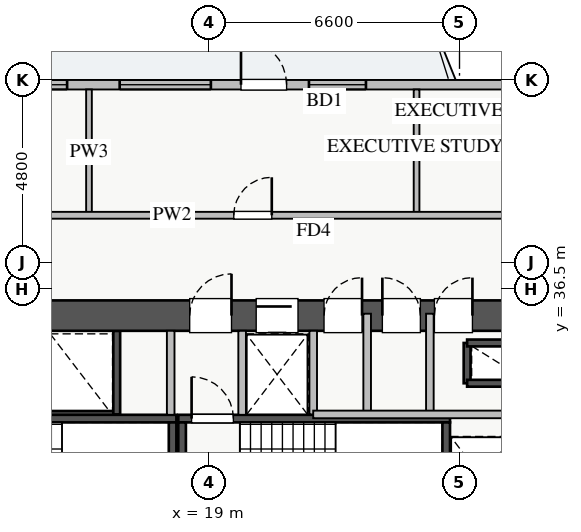
"""IFC4 building model, lengths in metres.
Left out: names, types, materials, properties, quantities, classifications, styles, units other than length and angle.
Written with IfcOpenShell. Run it as: python <this file> out.ifc"""

import sys

from ifc_helpers import new_model, si_unit, direction, frame, frame_2d, origin, place, context, subcontext, project, spatial, rectangle, extrude, source, transform, mapped, element, fill, save


model = new_model("IFC4")
c1 = context("Model", 3, precision=1e-05, world=origin(), true_north=direction((0.0, 1.0)))
c2 = subcontext(c1, "Body", "Model", "MODEL_VIEW")
j1 = project(units=[si_unit("LENGTHUNIT", "METRE"), si_unit("PLANEANGLEUNIT", "RADIAN")], contexts=[c1])
p1 = place(None, origin())
s1 = spatial("IfcSite", under=j1, at=p1, CompositionType="ELEMENT")
p2 = place(p1, origin())
s2 = spatial("IfcBuilding", under=s1, at=p2, CompositionType="ELEMENT")
p3 = place(p2, frame((0.0, 0.0, 89.25)))
s3 = spatial("IfcBuildingStorey", under=s2, at=p3, CompositionType="ELEMENT", Elevation=89.25)
p4 = place(p3, frame((25.8, 34.02, 0.0), z_axis=(0.0, 0.0, 1.0), x_axis=(0.0, 1.0, 0.0)))
e1 = element("IfcWall", 1, at=p4, inside=s3, PredefinedType="SHEAR", context=c2, shape_type="SweptSolid", body=[
    extrude(rectangle(XDim=1.06, YDim=0.18, at=frame_2d((0.53, 0.0))), origin(), (0.0, 0.0, 1.0), 3.03),
])
for number, where, z_axis, x_axis in (
    (2, (25.8, 35.08, 0.0), (0.0, 0.0, 1.0), (1.0, 0.0, 0.0)),
    (3, (25.8, 34.02, 0.0), (0.0, 0.0, 1.0), (1.0, 0.0, 0.0)),
):
    element("IfcWall", number, at=place(p3, frame(where, z_axis=z_axis, x_axis=x_axis)), inside=s3, PredefinedType="SHEAR", context=c2, shape_type="SweptSolid", body=[
        extrude(rectangle(XDim=1.2, YDim=0.18, at=frame_2d((0.6, 0.0))), origin(), (0.0, 0.0, 1.0), 3.03),
    ])
p5 = place(p3, frame((14.62, 33.2, 0.0), z_axis=(0.0, 0.0, 1.0), x_axis=(1.0, 0.0, 0.0)))
e4 = element("IfcWall", 4, at=p5, inside=s3, PredefinedType="SHEAR", context=c2, shape_type="SweptSolid", body=[
    extrude(rectangle(XDim=1.96, YDim=0.18, at=frame_2d((0.98, 0.0))), origin(), (0.0, 0.0, 1.0), 3.03),
])
p6 = place(p3, frame((16.58, 33.2, 0.0), z_axis=(0.0, 0.0, 1.0), x_axis=(0.0, 1.0, 0.0)))
e5 = element("IfcWall", 5, at=p6, inside=s3, PredefinedType="SHEAR", context=c2, shape_type="SweptSolid", body=[
    extrude(rectangle(XDim=2.2, YDim=0.18, at=frame_2d((1.1, 0.0))), origin(), (0.0, 0.0, 1.0), 3.03),
])
p7 = place(p3, frame((19.88, 33.2, 0.0), z_axis=(0.0, 0.0, 1.0), x_axis=(1.0, 0.0, 0.0)))
e6 = element("IfcWall", 6, at=p7, inside=s3, PredefinedType="SHEAR", context=c2, shape_type="SweptSolid", body=[
    extrude(rectangle(XDim=1.87, YDim=0.18, at=frame_2d((0.935, 0.0))), origin(), (0.0, 0.0, 1.0), 3.03),
])
p8 = place(p3, frame((11.0, 33.09, 0.0), z_axis=(0.0, 0.0, 1.0), x_axis=(1.0, 0.0, 0.0)))
e7 = element("IfcWall", 7, at=p8, inside=s3, PredefinedType="SHEAR", context=c2, shape_type="SweptSolid", body=[
    extrude(rectangle(XDim=7.15, YDim=0.2, at=frame_2d((3.575, 0.0))), origin(), (0.0, 0.0, 1.0), 3.25),
])
p9 = place(p8, frame((0.35, 0.0, 0.0)))
e8 = element("IfcOpeningElement", 8, at=p9, cuts=e7, PredefinedType="OPENING", context=c2, shape_type="SweptSolid", body=[
    extrude(rectangle(XDim=1.1, YDim=2.05, at=frame_2d((0.55, 1.025))), frame((0.0, 0.11, 0.0), z_axis=(0.0, -1.0, 0.0), x_axis=(1.0, 0.0, 0.0)), (0.0, 0.0, 1.0), 0.22),
])
p10 = place(p3, frame((18.05, 30.05, 0.0), z_axis=(0.0, 0.0, 1.0), x_axis=(0.0, 1.0, 0.0)))
e9 = element("IfcWall", 9, at=p10, inside=s3, PredefinedType="SHEAR", context=c2, shape_type="SweptSolid", body=[
    extrude(rectangle(XDim=2.94, YDim=0.2, at=frame_2d((1.47, 0.0))), origin(), (0.0, 0.0, 1.0), 3.25),
])
p11 = place(p3, frame((18.2, 33.09, 0.0), z_axis=(0.0, 0.0, 1.0), x_axis=(1.0, 0.0, 0.0)))
e10 = element("IfcWall", 10, at=p11, inside=s3, PredefinedType="SHEAR", context=c2, shape_type="SweptSolid", body=[
    extrude(rectangle(XDim=7.15, YDim=0.2, at=frame_2d((3.575, 0.0))), origin(), (0.0, 0.0, 1.0), 3.25),
])
p12 = place(p11, frame((0.35, 0.0, 0.0)))
e11 = element("IfcOpeningElement", 11, at=p12, cuts=e10, PredefinedType="OPENING", context=c2, shape_type="SweptSolid", body=[
    extrude(rectangle(XDim=1.1, YDim=2.05, at=frame_2d((0.55, 1.025))), frame((0.0, 0.11, 0.0), z_axis=(0.0, -1.0, 0.0), x_axis=(1.0, 0.0, 0.0)), (0.0, 0.0, 1.0), 0.22),
])
for number, where, z_axis, x_axis in (
    (12, (18.3, 30.05, 0.0), (0.0, 0.0, 1.0), (0.0, 1.0, 0.0)),
    (13, (25.25, 30.05, 0.0), (0.0, 0.0, 1.0), (0.0, 1.0, 0.0)),
):
    element("IfcWall", number, at=place(p3, frame(where, z_axis=z_axis, x_axis=x_axis)), inside=s3, PredefinedType="SHEAR", context=c2, shape_type="SweptSolid", body=[
        extrude(rectangle(XDim=2.94, YDim=0.2, at=frame_2d((1.47, 0.0))), origin(), (0.0, 0.0, 1.0), 3.25),
    ])
p13 = place(p3, frame((10.2, 35.8, 0.0), z_axis=(0.0, 0.0, 1.0), x_axis=(1.0, 0.0, 0.0)))
e14 = element("IfcWall", 14, at=p13, inside=s3, PredefinedType="SHEAR", context=c2, shape_type="SweptSolid", body=[
    extrude(rectangle(XDim=17.6, YDim=0.8, at=frame_2d((8.8, 0.0))), origin(), (0.0, 0.0, 1.0), 3.25),
])
p14 = place(p13, frame((1.15, 0.0, 0.0)))
e15 = element("IfcOpeningElement", 15, at=p14, cuts=e14, PredefinedType="OPENING", context=c2, shape_type="SweptSolid", body=[
    extrude(rectangle(XDim=1.1, YDim=2.05, at=frame_2d((0.55, 1.025))), frame((0.0, 0.41, 0.0), z_axis=(0.0, -1.0, 0.0), x_axis=(1.0, 0.0, 0.0)), (0.0, 0.0, 1.0), 0.82),
])
p15 = place(p13, frame((8.3, 0.0, 0.0)))
e16 = element("IfcOpeningElement", 16, at=p15, cuts=e14, PredefinedType="OPENING", context=c2, shape_type="SweptSolid", body=[
    extrude(rectangle(XDim=1.1, YDim=2.05, at=frame_2d((0.55, 1.025))), frame((0.0, 0.41, 0.0), z_axis=(0.0, -1.0, 0.0), x_axis=(1.0, 0.0, 0.0)), (0.0, 0.0, 1.0), 0.82),
])
p16 = place(p13, frame((10.05, 0.0, 0.0)))
e17 = element("IfcOpeningElement", 17, at=p16, cuts=e14, PredefinedType="OPENING", context=c2, shape_type="SweptSolid", body=[
    extrude(rectangle(XDim=1.1, YDim=2.05, at=frame_2d((0.55, 1.025))), frame((0.0, 0.41, 0.0), z_axis=(0.0, -1.0, 0.0), x_axis=(1.0, 0.0, 0.0)), (0.0, 0.0, 1.0), 0.82),
])
p17 = place(p13, frame((14.74, 0.0, 0.0)))
e18 = element("IfcOpeningElement", 18, at=p17, cuts=e14, PredefinedType="OPENING", context=c2, shape_type="SweptSolid", body=[
    extrude(rectangle(XDim=1.0, YDim=2.05, at=frame_2d((0.5, 1.025))), frame((0.0, 0.41, 0.0), z_axis=(0.0, -1.0, 0.0), x_axis=(1.0, 0.0, 0.0)), (0.0, 0.0, 1.0), 0.82),
])
p18 = place(p13, frame((11.835, 0.0, 0.0)))
e19 = element("IfcOpeningElement", 19, at=p18, cuts=e14, PredefinedType="OPENING", context=c2, shape_type="SweptSolid", body=[
    extrude(rectangle(XDim=1.0, YDim=2.05, at=frame_2d((0.5, 1.025))), frame((0.0, 0.41, 0.0), z_axis=(0.0, -1.0, 0.0), x_axis=(1.0, 0.0, 0.0)), (0.0, 0.0, 1.0), 0.82),
])
p19 = place(p13, frame((13.37, 0.0, 0.0)))
e20 = element("IfcOpeningElement", 20, at=p19, cuts=e14, PredefinedType="OPENING", context=c2, shape_type="SweptSolid", body=[
    extrude(rectangle(XDim=1.0, YDim=2.05, at=frame_2d((0.5, 1.025))), frame((0.0, 0.41, 0.0), z_axis=(0.0, -1.0, 0.0), x_axis=(1.0, 0.0, 0.0)), (0.0, 0.0, 1.0), 0.82),
])
p20 = place(p3, frame((5.45, 41.875, 0.0), z_axis=(0.0, 0.0, 1.0), x_axis=(1.0, 0.0, 0.0)))
e21 = element("IfcWall", 21, at=p20, inside=s3, PredefinedType="STANDARD", context=c2, shape_type="SweptSolid", body=[
    extrude(rectangle(XDim=27.1, YDim=0.25, at=frame_2d((13.55, 0.0))), origin(), (0.0, 0.0, 1.0), 2.57),
])
p21 = place(p20, frame((14.4, 0.0, 0.0)))
e22 = element("IfcOpeningElement", 22, at=p21, cuts=e21, PredefinedType="OPENING", context=c2, shape_type="SweptSolid", body=[
    extrude(rectangle(XDim=1.2, YDim=2.1, at=frame_2d((0.6, 1.05))), frame((0.0, 0.135, 0.0), z_axis=(0.0, -1.0, 0.0), x_axis=(1.0, 0.0, 0.0)), (0.0, 0.0, 1.0), 0.27),
])
p22 = place(p20, frame((1.45, 0.0, 0.9)))
e23 = element("IfcOpeningElement", 23, at=p22, cuts=e21, PredefinedType="OPENING", context=c2, shape_type="SweptSolid", body=[
    extrude(rectangle(XDim=1.5, YDim=1.5, at=frame_2d((0.75, 0.75))), frame((0.0, 0.135, 0.0), z_axis=(0.0, -1.0, 0.0), x_axis=(1.0, 0.0, 0.0)), (0.0, 0.0, 1.0), 0.27),
])
p23 = place(p20, frame((8.024, 0.0, 0.9)))
e24 = element("IfcOpeningElement", 24, at=p23, cuts=e21, PredefinedType="OPENING", context=c2, shape_type="SweptSolid", body=[
    extrude(rectangle(XDim=1.8, YDim=1.5, at=frame_2d((0.9, 0.75))), frame((0.0, 0.135, 0.0), z_axis=(0.0, -1.0, 0.0), x_axis=(1.0, 0.0, 0.0)), (0.0, 0.0, 1.0), 0.27),
])
p24 = place(p20, frame((16.188, 0.0, 0.9)))
e25 = element("IfcOpeningElement", 25, at=p24, cuts=e21, PredefinedType="OPENING", context=c2, shape_type="SweptSolid", body=[
    extrude(rectangle(XDim=1.5, YDim=1.45, at=frame_2d((0.75, 0.725))), frame((0.0, 0.135, 0.0), z_axis=(0.0, -1.0, 0.0), x_axis=(1.0, 0.0, 0.0)), (0.0, 0.0, 1.0), 0.27),
])
p25 = place(p20, frame((22.663, 0.0, 0.9)))
e26 = element("IfcOpeningElement", 26, at=p25, cuts=e21, PredefinedType="OPENING", context=c2, shape_type="SweptSolid", body=[
    extrude(rectangle(XDim=2.1, YDim=1.48, at=frame_2d((1.05, 0.74))), frame((0.0, 0.135, 0.0), z_axis=(0.0, -1.0, 0.0), x_axis=(1.0, 0.0, 0.0)), (0.0, 0.0, 1.0), 0.27),
])
p26 = place(p20, frame((5.084, 0.0, 0.9)))
e27 = element("IfcOpeningElement", 27, at=p26, cuts=e21, PredefinedType="OPENING", context=c2, shape_type="SweptSolid", body=[
    extrude(rectangle(XDim=2.4, YDim=1.5, at=frame_2d((1.2, 0.75))), frame((0.0, 0.135, 0.0), z_axis=(0.0, -1.0, 0.0), x_axis=(1.0, 0.0, 0.0)), (0.0, 0.0, 1.0), 0.27),
])
p27 = place(p20, frame((11.208, 0.0, 0.9)))
e28 = element("IfcOpeningElement", 28, at=p27, cuts=e21, PredefinedType="OPENING", context=c2, shape_type="SweptSolid", body=[
    extrude(rectangle(XDim=2.4, YDim=1.5, at=frame_2d((1.2, 0.75))), frame((0.0, 0.135, 0.0), z_axis=(0.0, -1.0, 0.0), x_axis=(1.0, 0.0, 0.0)), (0.0, 0.0, 1.0), 0.27),
])
for number, where, z_axis, x_axis in (
    (29, (18.0, 33.19, 0.0), (0.0, 0.0, 1.0), (0.0, 1.0, 0.0)),
    (30, (19.88, 33.19, 0.0), (0.0, 0.0, 1.0), (0.0, 1.0, 0.0)),
):
    element("IfcWall", number, at=place(p3, frame(where, z_axis=z_axis, x_axis=x_axis)), inside=s3, PredefinedType="PARTITIONING", context=c2, shape_type="SweptSolid", body=[
        extrude(rectangle(XDim=2.21, YDim=0.2, at=frame_2d((1.105, 0.0))), origin(), (0.0, 0.0, 1.0), 3.03),
    ])
p28 = place(p3, frame((24.82, 33.2, 0.0), z_axis=(0.0, 0.0, 1.0), x_axis=(0.0, 1.0, 0.0)))
e31 = element("IfcWall", 31, at=p28, inside=s3, PredefinedType="PARTITIONING", context=c2, shape_type="SweptSolid", body=[
    extrude(rectangle(XDim=2.65, YDim=0.2, at=frame_2d((1.325, 0.0))), origin(), (0.0, 0.0, 1.0), 3.03),
])
p29 = place(p3, frame((21.75, 33.2, 0.0), z_axis=(0.0, 0.0, 1.0), x_axis=(0.0, 1.0, 0.0)))
e32 = element("IfcWall", 32, at=p29, inside=s3, PredefinedType="PARTITIONING", context=c2, shape_type="SweptSolid", body=[
    extrude(rectangle(XDim=2.2, YDim=0.2, at=frame_2d((1.1, 0.0))), origin(), (0.0, 0.0, 1.0), 3.03),
])
p30 = place(p3, frame((23.17, 33.2, 0.0), z_axis=(0.0, 0.0, 1.0), x_axis=(0.0, 1.0, 0.0)))
e33 = element("IfcWall", 33, at=p30, inside=s3, PredefinedType="PARTITIONING", context=c2, shape_type="SweptSolid", body=[
    extrude(rectangle(XDim=2.65, YDim=0.2, at=frame_2d((1.325, 0.0))), origin(), (0.0, 0.0, 1.0), 3.03),
])
p31 = place(p3, frame((21.75, 33.2, 0.0), z_axis=(0.0, 0.0, 1.0), x_axis=(1.0, 0.0, 0.0)))
e34 = element("IfcWall", 34, at=p31, inside=s3, PredefinedType="PARTITIONING", context=c2, shape_type="SweptSolid", body=[
    extrude(rectangle(XDim=5.17, YDim=0.2, at=frame_2d((2.585, 0.0))), origin(), (0.0, 0.0, 1.0), 3.03),
])
p32 = place(p3, frame((15.85, 38.44, 0.0), z_axis=(0.0, 0.0, 1.0), x_axis=(0.0, 1.0, 0.0)))
e35 = element("IfcWall", 35, at=p32, inside=s3, PredefinedType="PARTITIONING", context=c2, shape_type="SweptSolid", body=[
    extrude(rectangle(XDim=3.31, YDim=0.15, at=frame_2d((1.655, 0.0))), origin(), (0.0, 0.0, 1.0), 2.725),
])
p33 = place(p3, frame((24.47, 38.44, 0.0), z_axis=(0.0, 0.0, 1.0), x_axis=(0.0, 1.0, 0.0)))
e36 = element("IfcWall", 36, at=p33, inside=s3, PredefinedType="PARTITIONING", context=c2, shape_type="SweptSolid", body=[
    extrude(rectangle(XDim=3.31, YDim=0.15, at=frame_2d((1.655, 0.0))), origin(), (0.0, 0.0, 1.0), 3.03),
])
p34 = place(p3, frame((8.72, 38.44, 0.0), z_axis=(0.0, 0.0, 1.0), x_axis=(1.0, 0.0, 0.0)))
e37 = element("IfcWall", 37, at=p34, inside=s3, PredefinedType="PARTITIONING", context=c2, shape_type="SweptSolid", body=[
    extrude(rectangle(XDim=23.63, YDim=0.18, at=frame_2d((11.815, 0.0))), origin(), (0.0, 0.0, 1.0), 3.03),
])
p35 = place(p34, frame((3.065, 0.0, 0.0)))
e38 = element("IfcOpeningElement", 38, at=p35, cuts=e37, PredefinedType="OPENING", context=c2, shape_type="SweptSolid", body=[
    extrude(rectangle(XDim=1.0, YDim=2.05, at=frame_2d((0.5, 1.025))), frame((0.0, 0.1, 0.0), z_axis=(0.0, -1.0, 0.0), x_axis=(1.0, 0.0, 0.0)), (0.0, 0.0, 1.0), 0.2),
])
p36 = place(p34, frame((10.94, 0.0, 0.0)))
e39 = element("IfcOpeningElement", 39, at=p36, cuts=e37, PredefinedType="OPENING", context=c2, shape_type="SweptSolid", body=[
    extrude(rectangle(XDim=1.0, YDim=2.05, at=frame_2d((0.5, 1.025))), frame((0.0, 0.1, 0.0), z_axis=(0.0, -1.0, 0.0), x_axis=(1.0, 0.0, 0.0)), (0.0, 0.0, 1.0), 0.2),
])
p37 = place(p34, frame((19.19, 0.0, 0.0)))
e40 = element("IfcOpeningElement", 40, at=p37, cuts=e37, PredefinedType="OPENING", context=c2, shape_type="SweptSolid", body=[
    extrude(rectangle(XDim=1.0, YDim=2.05, at=frame_2d((0.5, 1.025))), frame((0.0, 0.1, 0.0), z_axis=(0.0, -1.0, 0.0), x_axis=(1.0, 0.0, 0.0)), (0.0, 0.0, 1.0), 0.2),
])
m1 = source(origin(), c2, "Body", "SweptSolid", [
    extrude(rectangle(XDim=1.2, YDim=2.1, at=frame_2d((0.6, 1.05))), frame((0.0, 0.025, 0.0), z_axis=(0.0, -1.0, 0.0), x_axis=(1.0, 0.0, 0.0)), (0.0, 0.0, 1.0), 0.05),
])
p38 = place(p21, origin())
e41 = element("IfcDoor", 41, at=p38, inside=s3, OperationType="SINGLE_SWING_LEFT", PredefinedType="DOOR", context=c2, shape_type="MappedRepresentation", body=[
    mapped(m1, transform((0.0, 0.0, 0.0), x_axis=(1.0, 0.0, 0.0), y_axis=(0.0, 1.0, 0.0), z_axis=(0.0, 0.0, 1.0), scale=1.0)),
])
fill(e22, e41)
m2 = source(origin(), c2, "Body", "SweptSolid", [
    extrude(rectangle(XDim=1.8, YDim=1.5, at=frame_2d((0.9, 0.75))), frame((0.0, 0.03, 0.0), z_axis=(0.0, -1.0, 0.0), x_axis=(1.0, 0.0, 0.0)), (0.0, 0.0, 1.0), 0.06),
])
p39 = place(p23, origin())
e42 = element("IfcWindow", 42, at=p39, inside=s3, PartitioningType="DOUBLE_PANEL_VERTICAL", PredefinedType="WINDOW", context=c2, shape_type="MappedRepresentation", body=[
    mapped(m2, transform((0.0, 0.0, 0.0), x_axis=(1.0, 0.0, 0.0), y_axis=(0.0, 1.0, 0.0), z_axis=(0.0, 0.0, 1.0), scale=1.0)),
])
fill(e24, e42)
m3 = source(origin(), c2, "Body", "SweptSolid", [
    extrude(rectangle(XDim=1.5, YDim=1.45, at=frame_2d((0.75, 0.725))), frame((0.0, 0.03, 0.0), z_axis=(0.0, -1.0, 0.0), x_axis=(1.0, 0.0, 0.0)), (0.0, 0.0, 1.0), 0.06),
])
p40 = place(p24, origin())
e43 = element("IfcWindow", 43, at=p40, inside=s3, PartitioningType="DOUBLE_PANEL_VERTICAL", PredefinedType="WINDOW", context=c2, shape_type="MappedRepresentation", body=[
    mapped(m3, transform((0.0, 0.0, 0.0), x_axis=(1.0, 0.0, 0.0), y_axis=(0.0, 1.0, 0.0), z_axis=(0.0, 0.0, 1.0), scale=1.0)),
])
fill(e25, e43)
m4 = source(origin(), c2, "Body", "SweptSolid", [
    extrude(rectangle(XDim=1.1, YDim=2.05, at=frame_2d((0.55, 1.025))), frame((0.0, 0.025, 0.0), z_axis=(0.0, -1.0, 0.0), x_axis=(1.0, 0.0, 0.0)), (0.0, 0.0, 1.0), 0.05),
])
p41 = place(p15, origin())
e44 = element("IfcDoor", 44, at=p41, inside=s3, OperationType="SINGLE_SWING_RIGHT", PredefinedType="DOOR", context=c2, shape_type="MappedRepresentation", body=[
    mapped(m4, transform((0.0, 0.0, 0.0), x_axis=(1.0, 0.0, 0.0), y_axis=(0.0, 1.0, 0.0), z_axis=(0.0, 0.0, 1.0), scale=1.0)),
])
fill(e16, e44)
p42 = place(p12, origin())
e45 = element("IfcDoor", 45, at=p42, inside=s3, OperationType="SINGLE_SWING_LEFT", PredefinedType="DOOR", context=c2, shape_type="MappedRepresentation", body=[
    mapped(m4, transform((0.0, 0.0, 0.0), x_axis=(1.0, 0.0, 0.0), y_axis=(0.0, 1.0, 0.0), z_axis=(0.0, 0.0, 1.0), scale=1.0)),
])
fill(e11, e45)
p43 = place(p16, origin())
e46 = element("IfcDoor", 46, at=p43, inside=s3, OperationType="SLIDING_TO_LEFT", PredefinedType="DOOR", context=c2, shape_type="MappedRepresentation", body=[
    mapped(m4, transform((0.0, 0.0, 0.0), x_axis=(1.0, 0.0, 0.0), y_axis=(0.0, 1.0, 0.0), z_axis=(0.0, 0.0, 1.0), scale=1.0)),
])
fill(e17, e46)
m5 = source(origin(), c2, "Body", "SweptSolid", [
    extrude(rectangle(XDim=1.0, YDim=2.05, at=frame_2d((0.5, 1.025))), frame((0.0, 0.025, 0.0), z_axis=(0.0, -1.0, 0.0), x_axis=(1.0, 0.0, 0.0)), (0.0, 0.0, 1.0), 0.05),
])
p44 = place(p17, origin())
e47 = element("IfcDoor", 47, at=p44, inside=s3, OperationType="SINGLE_SWING_RIGHT", PredefinedType="DOOR", context=c2, shape_type="MappedRepresentation", body=[
    mapped(m5, transform((0.0, 0.0, 0.0), x_axis=(1.0, 0.0, 0.0), y_axis=(0.0, 1.0, 0.0), z_axis=(0.0, 0.0, 1.0), scale=1.0)),
])
fill(e18, e47)
p45 = place(p18, origin())
e48 = element("IfcDoor", 48, at=p45, inside=s3, OperationType="SINGLE_SWING_RIGHT", PredefinedType="DOOR", context=c2, shape_type="MappedRepresentation", body=[
    mapped(m5, transform((0.0, 0.0, 0.0), x_axis=(1.0, 0.0, 0.0), y_axis=(0.0, 1.0, 0.0), z_axis=(0.0, 0.0, 1.0), scale=1.0)),
])
fill(e19, e48)
p46 = place(p19, origin())
e49 = element("IfcDoor", 49, at=p46, inside=s3, OperationType="SINGLE_SWING_LEFT", PredefinedType="DOOR", context=c2, shape_type="MappedRepresentation", body=[
    mapped(m5, transform((0.0, 0.0, 0.0), x_axis=(1.0, 0.0, 0.0), y_axis=(0.0, 1.0, 0.0), z_axis=(0.0, 0.0, 1.0), scale=1.0)),
])
fill(e20, e49)
p47 = place(p36, origin())
e50 = element("IfcDoor", 50, at=p47, inside=s3, OperationType="SINGLE_SWING_RIGHT", PredefinedType="DOOR", context=c2, shape_type="MappedRepresentation", body=[
    mapped(m5, transform((0.0, 0.0, 0.0), x_axis=(1.0, 0.0, 0.0), y_axis=(0.0, 1.0, 0.0), z_axis=(0.0, 0.0, 1.0), scale=1.0)),
])
fill(e39, e50)
m6 = source(origin(), c2, "Body", "SweptSolid", [
    extrude(rectangle(XDim=2.4, YDim=1.5, at=frame_2d((1.2, 0.75))), frame((0.0, 0.03, 0.0), z_axis=(0.0, -1.0, 0.0), x_axis=(1.0, 0.0, 0.0)), (0.0, 0.0, 1.0), 0.06),
])
p48 = place(p27, origin())
e51 = element("IfcWindow", 51, at=p48, inside=s3, PartitioningType="TRIPLE_PANEL_VERTICAL", PredefinedType="WINDOW", context=c2, shape_type="MappedRepresentation", body=[
    mapped(m6, transform((0.0, 0.0, 0.0), x_axis=(1.0, 0.0, 0.0), y_axis=(0.0, 1.0, 0.0), z_axis=(0.0, 0.0, 1.0), scale=1.0)),
])
fill(e28, e51)
save(model, sys.argv[1])
